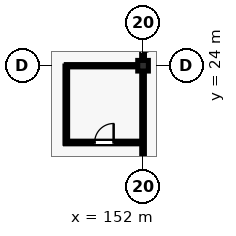
"""IFC4 building model, lengths in metres.
Left out: names, types, materials, properties, quantities, classifications, styles, units other than length and angle.
Written with IfcOpenShell. Run it as: python <this file> out.ifc"""

import sys

from ifc_helpers import new_model, si_unit, direction, frame, frame_2d, origin, origin_2d, place, context, subcontext, project, spatial, rectangle, extrude, element, fill, save


model = new_model("IFC4")
c1 = context("Model", 3, precision=1e-05, world=origin(), true_north=direction((0.0, 1.0)))
c2 = subcontext(c1, "Body", "Model", "MODEL_VIEW")
j1 = project(units=[si_unit("LENGTHUNIT", "METRE"), si_unit("PLANEANGLEUNIT", "RADIAN")], contexts=[c1])
p1 = place(None, origin())
s1 = spatial("IfcSite", under=j1, at=p1, CompositionType="ELEMENT")
p2 = place(p1, origin())
s2 = spatial("IfcBuilding", under=s1, at=p2, CompositionType="ELEMENT")
p3 = place(p2, origin())
s3 = spatial("IfcBuildingStorey", under=s2, at=p3, CompositionType="ELEMENT", Elevation=0.0)
p4 = place(p3, frame((152.0, 24.0, 0.0), z_axis=(0.0, 0.0, 1.0), x_axis=(1.0, 0.0, 0.0)))
e1 = element("IfcColumn", 1, at=p4, inside=s3, PredefinedType="COLUMN", context=c2, shape_type="SweptSolid", body=[
    extrude(rectangle(XDim=0.7, YDim=0.7, at=origin_2d()), origin(), (0.0, 0.0, 1.0), 5.28),
])
p5 = place(p3, frame((146.9, 18.95, 0.0), z_axis=(0.0, 0.0, 1.0), x_axis=(1.0, 0.0, 0.0)))
e2 = element("IfcWall", 2, at=p5, inside=s3, PredefinedType="PARTITIONING", context=c2, shape_type="SweptSolid", body=[
    extrude(rectangle(XDim=5.08, YDim=0.175, at=frame_2d((2.54, 0.0))), origin(), (0.0, 0.0, 1.0), 5.025),
])
p6 = place(p5, frame((1.915, 0.0, 0.0)))
e3 = element("IfcOpeningElement", 3, at=p6, cuts=e2, PredefinedType="OPENING", context=c2, shape_type="SweptSolid", body=[
    extrude(rectangle(XDim=1.25, YDim=2.18, at=frame_2d((0.625, 1.09))), frame((0.0, 0.097, 0.0), z_axis=(0.0, -1.0, 0.0), x_axis=(1.0, 0.0, 0.0)), (0.0, 0.0, 1.0), 0.195),
])
p7 = place(p3, frame((146.95, 18.9, 0.0), z_axis=(0.0, 0.0, 1.0), x_axis=(0.0, 1.0, 0.0)))
e4 = element("IfcWall", 4, at=p7, inside=s3, PredefinedType="PARTITIONING", context=c2, shape_type="SweptSolid", body=[
    extrude(rectangle(XDim=5.08, YDim=0.175, at=frame_2d((2.54, 0.0))), origin(), (0.0, 0.0, 1.0), 5.025),
])
p8 = place(p3, frame((146.95, 24.0, 0.0), z_axis=(0.0, 0.0, 1.0), x_axis=(1.0, 0.0, 0.0)))
e5 = element("IfcWall", 5, at=p8, inside=s3, PredefinedType="PARTITIONING", context=c2, shape_type="SweptSolid", body=[
    extrude(rectangle(XDim=4.69, YDim=0.15, at=frame_2d((2.345, 0.0))), origin(), (0.0, 0.0, 1.0), 5.025),
])
p9 = place(p3, frame((152.0, 16.34, 0.0), z_axis=(0.0, 0.0, 1.0), x_axis=(0.0, 1.0, 0.0)))
e6 = element("IfcWall", 6, at=p9, inside=s3, PredefinedType="PARTITIONING", context=c2, shape_type="SweptSolid", body=[
    extrude(rectangle(XDim=7.32, YDim=0.175, at=frame_2d((3.66, 0.0))), origin(), (0.0, 0.0, 1.0), 5.025),
])
p10 = place(p9, frame((0.52, 0.0, 0.0)))
e7 = element("IfcOpeningElement", 7, at=p10, cuts=e6, PredefinedType="OPENING", context=c2, shape_type="SweptSolid", body=[
    extrude(rectangle(XDim=0.94, YDim=2.12, at=frame_2d((0.47, 1.06))), frame((0.0, 0.097, 0.0), z_axis=(0.0, -1.0, 0.0), x_axis=(1.0, 0.0, 0.0)), (0.0, 0.0, 1.0), 0.195),
])
p11 = place(p3, frame((152.0, 24.34, 0.0), z_axis=(0.0, 0.0, 1.0), x_axis=(0.0, 1.0, 0.0)))
e8 = element("IfcWall", 8, at=p11, inside=s3, PredefinedType="PARTITIONING", context=c2, shape_type="SweptSolid", body=[
    extrude(rectangle(XDim=7.32, YDim=0.185, at=frame_2d((3.66, 0.0))), origin(), (0.0, 0.0, 1.0), 5.025),
])
p12 = place(p11, frame((0.52, 0.0, 0.0)))
e9 = element("IfcOpeningElement", 9, at=p12, cuts=e8, PredefinedType="OPENING", context=c2, shape_type="SweptSolid", body=[
    extrude(rectangle(XDim=0.94, YDim=2.12, at=frame_2d((0.47, 1.06))), frame((0.0, 0.103, 0.0), z_axis=(0.0, -1.0, 0.0), x_axis=(1.0, 0.0, 0.0)), (0.0, 0.0, 1.0), 0.205),
])
p13 = place(p6, origin())
e10 = element("IfcDoor", 10, at=p13, inside=s3, OperationType="SINGLE_SWING_RIGHT", PredefinedType="DOOR", context=c2, shape_type="SweptSolid", body=[
    extrude(rectangle(XDim=1.25, YDim=2.18, at=frame_2d((0.625, 1.09))), frame((0.0, 0.025, 0.0), z_axis=(0.0, -1.0, 0.0), x_axis=(1.0, 0.0, 0.0)), (0.0, 0.0, 1.0), 0.05),
])
fill(e3, e10)
p14 = place(p12, frame((0.94, 0.0, 0.0), z_axis=(0.0, 0.0, 1.0), x_axis=(-1.0, 0.0, 0.0)))
e11 = element("IfcDoor", 11, at=p14, inside=s3, OperationType="SINGLE_SWING_RIGHT", PredefinedType="DOOR", context=c2, shape_type="SweptSolid", body=[
    extrude(rectangle(XDim=0.94, YDim=2.12, at=frame_2d((0.47, 1.06))), frame((0.0, 0.025, 0.0), z_axis=(0.0, -1.0, 0.0), x_axis=(1.0, 0.0, 0.0)), (0.0, 0.0, 1.0), 0.05),
])
fill(e9, e11)
save(model, sys.argv[1])
